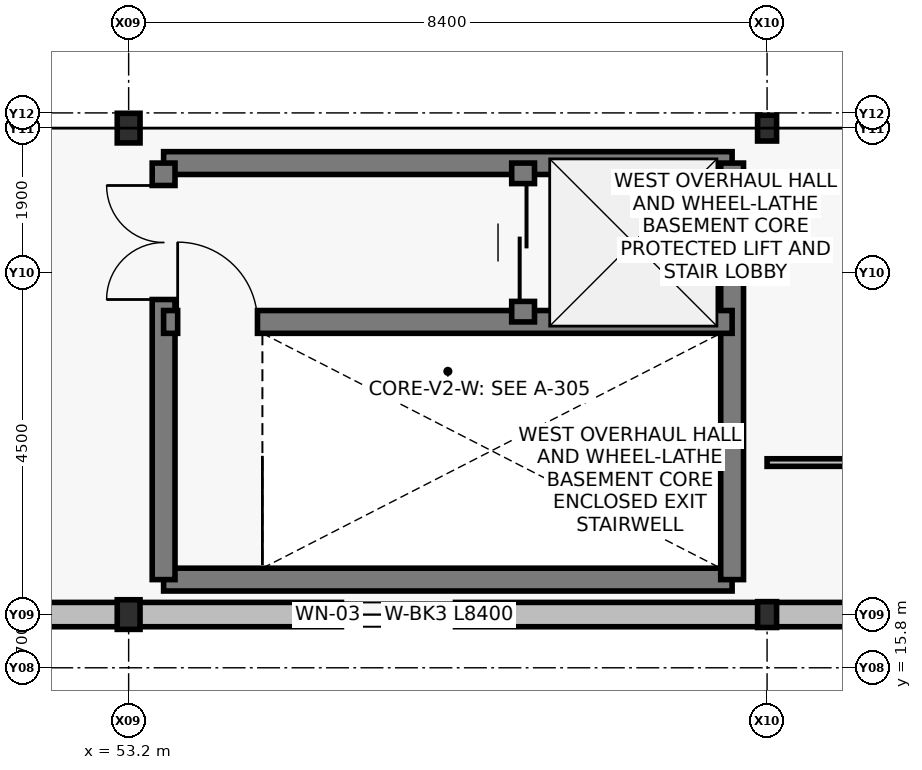
"""IFC4 building model, lengths in metres.
Left out: names, types, materials, properties, quantities, classifications, styles, units other than length and angle.
Written with IfcOpenShell. Run it as: python <this file> out.ifc"""

import sys

from ifc_helpers import new_model, si_unit, direction, frame, frame_2d, origin, origin_2d, place, context, subcontext, project, spatial, rectangle, i_section, extrude, element, fill, save


model = new_model("IFC4")
c1 = context("Model", 3, precision=1e-05, world=origin(), true_north=direction((0.0, 1.0)))
c2 = subcontext(c1, "Body", "Model", "MODEL_VIEW")
j1 = project(units=[si_unit("LENGTHUNIT", "METRE"), si_unit("PLANEANGLEUNIT", "RADIAN")], contexts=[c1])
p1 = place(None, origin())
s1 = spatial("IfcSite", under=j1, at=p1, CompositionType="ELEMENT")
p2 = place(p1, origin())
s2 = spatial("IfcBuilding", under=s1, at=p2, CompositionType="ELEMENT")
p3 = place(p2, frame((0.0, 0.0, 11.1)))
s3 = spatial("IfcBuildingStorey", under=s2, at=p3, CompositionType="ELEMENT", Elevation=11.1)
for number, where, z_axis, x_axis in (
    (1, (53.2, 16.5, 0.0), (0.0, 0.0, 1.0), (1.0, 0.0, 0.0)),
    (2, (53.2, 22.9, 0.0), (0.0, 0.0, 1.0), (1.0, 0.0, 0.0)),
):
    element("IfcColumn", number, at=place(p3, frame(where, z_axis=z_axis, x_axis=x_axis)), inside=s3, PredefinedType="COLUMN", context=c2, shape_type="SweptSolid", body=[
        extrude(i_section(OverallWidth=0.3, OverallDepth=0.39, WebThickness=0.01, FlangeThickness=0.016, at=origin_2d()), origin(), (0.0, 0.0, 1.0), 4.2),
    ])
for number, where, z_axis, x_axis in (
    (3, (61.6, 16.5, 0.0), (0.0, 0.0, 1.0), (1.0, 0.0, 0.0)),
    (4, (61.6, 22.9, 0.0), (0.0, 0.0, 1.0), (1.0, 0.0, 0.0)),
):
    element("IfcColumn", number, at=place(p3, frame(where, z_axis=z_axis, x_axis=x_axis)), inside=s3, PredefinedType="COLUMN", context=c2, shape_type="SweptSolid", body=[
        extrude(i_section(OverallWidth=0.25, OverallDepth=0.34, WebThickness=0.009, FlangeThickness=0.014, at=origin_2d()), origin(), (0.0, 0.0, 1.0), 4.2),
    ])
p4 = place(p3, frame((44.8, 16.5, 0.0), z_axis=(0.0, 0.0, 1.0), x_axis=(1.0, 0.0, 0.0)))
e5 = element("IfcWall", 5, at=p4, inside=s3, PredefinedType="SOLIDWALL", context=c2, shape_type="SweptSolid", body=[
    extrude(rectangle(XDim=8.4, YDim=0.32, at=frame_2d((4.2, 0.0))), origin(), (0.0, 0.0, 1.0), 3.4),
])
p5 = place(p4, frame((2.8, 0.0, 0.9)))
e6 = element("IfcOpeningElement", 6, at=p5, cuts=e5, PredefinedType="OPENING", context=c2, shape_type="SweptSolid", body=[
    extrude(rectangle(XDim=1.2, YDim=1.5, at=frame_2d((0.6, 0.75))), frame((0.0, 0.17, 0.0), z_axis=(0.0, -1.0, 0.0), x_axis=(1.0, 0.0, 0.0)), (0.0, 0.0, 1.0), 0.34),
])
p6 = place(p3, frame((53.2, 16.5, 0.0), z_axis=(0.0, 0.0, 1.0), x_axis=(1.0, 0.0, 0.0)))
e7 = element("IfcWall", 7, at=p6, inside=s3, PredefinedType="SOLIDWALL", context=c2, shape_type="SweptSolid", body=[
    extrude(rectangle(XDim=8.4, YDim=0.32, at=frame_2d((4.2, 0.0))), origin(), (0.0, 0.0, 1.0), 3.4),
])
p7 = place(p6, frame((2.8, 0.0, 0.9)))
e8 = element("IfcOpeningElement", 8, at=p7, cuts=e7, PredefinedType="OPENING", context=c2, shape_type="SweptSolid", body=[
    extrude(rectangle(XDim=1.5, YDim=1.8, at=frame_2d((0.75, 0.9))), frame((0.0, 0.17, 0.0), z_axis=(0.0, -1.0, 0.0), x_axis=(1.0, 0.0, 0.0)), (0.0, 0.0, 1.0), 0.34),
])
p8 = place(p3, frame((61.6, 16.5, 0.0), z_axis=(0.0, 0.0, 1.0), x_axis=(1.0, 0.0, 0.0)))
e9 = element("IfcWall", 9, at=p8, inside=s3, PredefinedType="SOLIDWALL", context=c2, shape_type="SweptSolid", body=[
    extrude(rectangle(XDim=8.4, YDim=0.32, at=frame_2d((4.2, 0.0))), origin(), (0.0, 0.0, 1.0), 3.4),
])
p9 = place(p8, frame((2.8, 0.0, 0.9)))
e10 = element("IfcOpeningElement", 10, at=p9, cuts=e9, PredefinedType="OPENING", context=c2, shape_type="SweptSolid", body=[
    extrude(rectangle(XDim=1.6, YDim=1.8, at=frame_2d((0.8, 0.9))), frame((0.0, 0.17, 0.0), z_axis=(0.0, -1.0, 0.0), x_axis=(1.0, 0.0, 0.0)), (0.0, 0.0, 1.0), 0.34),
])
for number, where, z_axis, x_axis in (
    (11, (53.66, 16.96, 0.0), (0.0, 0.0, 1.0), (1.0, 0.0, 0.0)),
    (12, (53.66, 22.44, 0.0), (0.0, 0.0, 1.0), (1.0, 0.0, 0.0)),
):
    element("IfcWall", number, at=place(p3, frame(where, z_axis=z_axis, x_axis=x_axis)), inside=s3, PredefinedType="SHEAR", context=c2, shape_type="SweptSolid", body=[
        extrude(rectangle(XDim=7.48, YDim=0.3, at=frame_2d((3.74, 0.0))), origin(), (0.0, 0.0, 1.0), 3.92),
    ])
p10 = place(p3, frame((53.66, 16.96, 0.0), z_axis=(0.0, 0.0, 1.0), x_axis=(0.0, 1.0, 0.0)))
e13 = element("IfcWall", 13, at=p10, inside=s3, PredefinedType="SHEAR", context=c2, shape_type="SweptSolid", body=[
    extrude(rectangle(XDim=5.48, YDim=0.3, at=frame_2d((2.74, 0.0))), origin(), (0.0, 0.0, 1.0), 3.92),
])
p11 = place(p10, frame((3.685, 0.0, 0.0)))
e14 = element("IfcOpeningElement", 14, at=p11, cuts=e13, PredefinedType="OPENING", context=c2, shape_type="SweptSolid", body=[
    extrude(rectangle(XDim=1.5, YDim=2.2, at=frame_2d((0.75, 1.1))), frame((0.0, 0.16, 0.0), z_axis=(0.0, -1.0, 0.0), x_axis=(1.0, 0.0, 0.0)), (0.0, 0.0, 1.0), 0.32),
])
p12 = place(p3, frame((61.14, 16.96, 0.0), z_axis=(0.0, 0.0, 1.0), x_axis=(0.0, 1.0, 0.0)))
e15 = element("IfcWall", 15, at=p12, inside=s3, PredefinedType="SHEAR", context=c2, shape_type="SweptSolid", body=[
    extrude(rectangle(XDim=5.48, YDim=0.3, at=frame_2d((2.74, 0.0))), origin(), (0.0, 0.0, 1.0), 3.92),
])
p13 = place(p3, frame((53.66, 20.35, 0.0), z_axis=(0.0, 0.0, 1.0), x_axis=(1.0, 0.0, 0.0)))
e16 = element("IfcWall", 16, at=p13, inside=s3, PredefinedType="SHEAR", context=c2, shape_type="SweptSolid", body=[
    extrude(rectangle(XDim=7.48, YDim=0.3, at=frame_2d((3.74, 0.0))), origin(), (0.0, 0.0, 1.0), 3.92),
])
p14 = place(p13, frame((0.185, 0.0, 0.0)))
e17 = element("IfcOpeningElement", 17, at=p14, cuts=e16, PredefinedType="OPENING", context=c2, shape_type="SweptSolid", body=[
    extrude(rectangle(XDim=1.05, YDim=2.15, at=frame_2d((0.525, 1.075))), frame((0.0, 0.16, 0.0), z_axis=(0.0, -1.0, 0.0), x_axis=(1.0, 0.0, 0.0)), (0.0, 0.0, 1.0), 0.32),
])
p15 = place(p3, frame((58.39, 20.35, 0.0), z_axis=(0.0, 0.0, 1.0), x_axis=(0.0, 1.0, 0.0)))
e18 = element("IfcWall", 18, at=p15, inside=s3, PredefinedType="SHEAR", context=c2, shape_type="SweptSolid", body=[
    extrude(rectangle(XDim=2.09, YDim=0.3, at=frame_2d((1.045, 0.0))), origin(), (0.0, 0.0, 1.0), 3.92),
])
p16 = place(p15, frame((0.27, 0.0, 0.0)))
e19 = element("IfcOpeningElement", 19, at=p16, cuts=e18, PredefinedType="OPENING", context=c2, shape_type="SweptSolid", body=[
    extrude(rectangle(XDim=1.55, YDim=2.35, at=frame_2d((0.775, 1.175))), frame((0.0, 0.16, 0.0), z_axis=(0.0, -1.0, 0.0), x_axis=(1.0, 0.0, 0.0)), (0.0, 0.0, 1.0), 0.32),
])
p17 = place(p3, frame((61.6, 18.5, 0.0), z_axis=(0.0, 0.0, 1.0), x_axis=(1.0, 0.0, 0.0)))
e20 = element("IfcWall", 20, at=p17, inside=s3, PredefinedType="PARTITIONING", context=c2, shape_type="SweptSolid", body=[
    extrude(rectangle(XDim=67.2, YDim=0.1, at=frame_2d((33.6, 0.0))), origin(), (0.0, 0.0, 1.0), 3.15),
])
p18 = place(p17, frame((18.0, 0.0, 0.0)))
e21 = element("IfcOpeningElement", 21, at=p18, cuts=e20, PredefinedType="OPENING", context=c2, shape_type="SweptSolid", body=[
    extrude(rectangle(XDim=1.4, YDim=2.2, at=frame_2d((0.7, 1.1))), frame((0.0, 0.06, 0.0), z_axis=(0.0, -1.0, 0.0), x_axis=(1.0, 0.0, 0.0)), (0.0, 0.0, 1.0), 0.12),
])
p19 = place(p17, frame((48.0, 0.0, 0.0)))
e22 = element("IfcOpeningElement", 22, at=p19, cuts=e20, PredefinedType="OPENING", context=c2, shape_type="SweptSolid", body=[
    extrude(rectangle(XDim=1.4, YDim=2.2, at=frame_2d((0.7, 1.1))), frame((0.0, 0.06, 0.0), z_axis=(0.0, -1.0, 0.0), x_axis=(1.0, 0.0, 0.0)), (0.0, 0.0, 1.0), 0.12),
])
p20 = place(p7, origin())
e23 = element("IfcWindow", 23, at=p20, inside=s3, PartitioningType="SINGLE_PANEL", PredefinedType="WINDOW", context=c2, shape_type="SweptSolid", body=[
    extrude(rectangle(XDim=1.5, YDim=1.8, at=frame_2d((0.75, 0.9))), frame((0.0, 0.03, 0.0), z_axis=(0.0, -1.0, 0.0), x_axis=(1.0, 0.0, 0.0)), (0.0, 0.0, 1.0), 0.06),
])
fill(e8, e23)
p21 = place(p14, origin())
e24 = element("IfcDoor", 24, at=p21, inside=s3, OperationType="SINGLE_SWING_LEFT", PredefinedType="DOOR", context=c2, shape_type="SweptSolid", body=[
    extrude(rectangle(XDim=1.05, YDim=2.15, at=frame_2d((0.525, 1.075))), frame((0.0, 0.025, 0.0), z_axis=(0.0, -1.0, 0.0), x_axis=(1.0, 0.0, 0.0)), (0.0, 0.0, 1.0), 0.05),
])
fill(e17, e24)
p22 = place(p11, origin())
e25 = element("IfcDoor", 25, at=p22, inside=s3, OperationType="DOUBLE_DOOR_SINGLE_SWING", PredefinedType="DOOR", context=c2, shape_type="SweptSolid", body=[
    extrude(rectangle(XDim=1.5, YDim=2.2, at=frame_2d((0.75, 1.1))), frame((0.0, 0.025, 0.0), z_axis=(0.0, -1.0, 0.0), x_axis=(1.0, 0.0, 0.0)), (0.0, 0.0, 1.0), 0.05),
])
fill(e14, e25)
p23 = place(p16, origin())
e26 = element("IfcDoor", 26, at=p23, inside=s3, OperationType="SLIDING_TO_LEFT", PredefinedType="DOOR", context=c2, shape_type="SweptSolid", body=[
    extrude(rectangle(XDim=1.55, YDim=2.35, at=frame_2d((0.775, 1.175))), frame((0.0, 0.025, 0.0), z_axis=(0.0, -1.0, 0.0), x_axis=(1.0, 0.0, 0.0)), (0.0, 0.0, 1.0), 0.05),
])
fill(e19, e26)
save(model, sys.argv[1])
